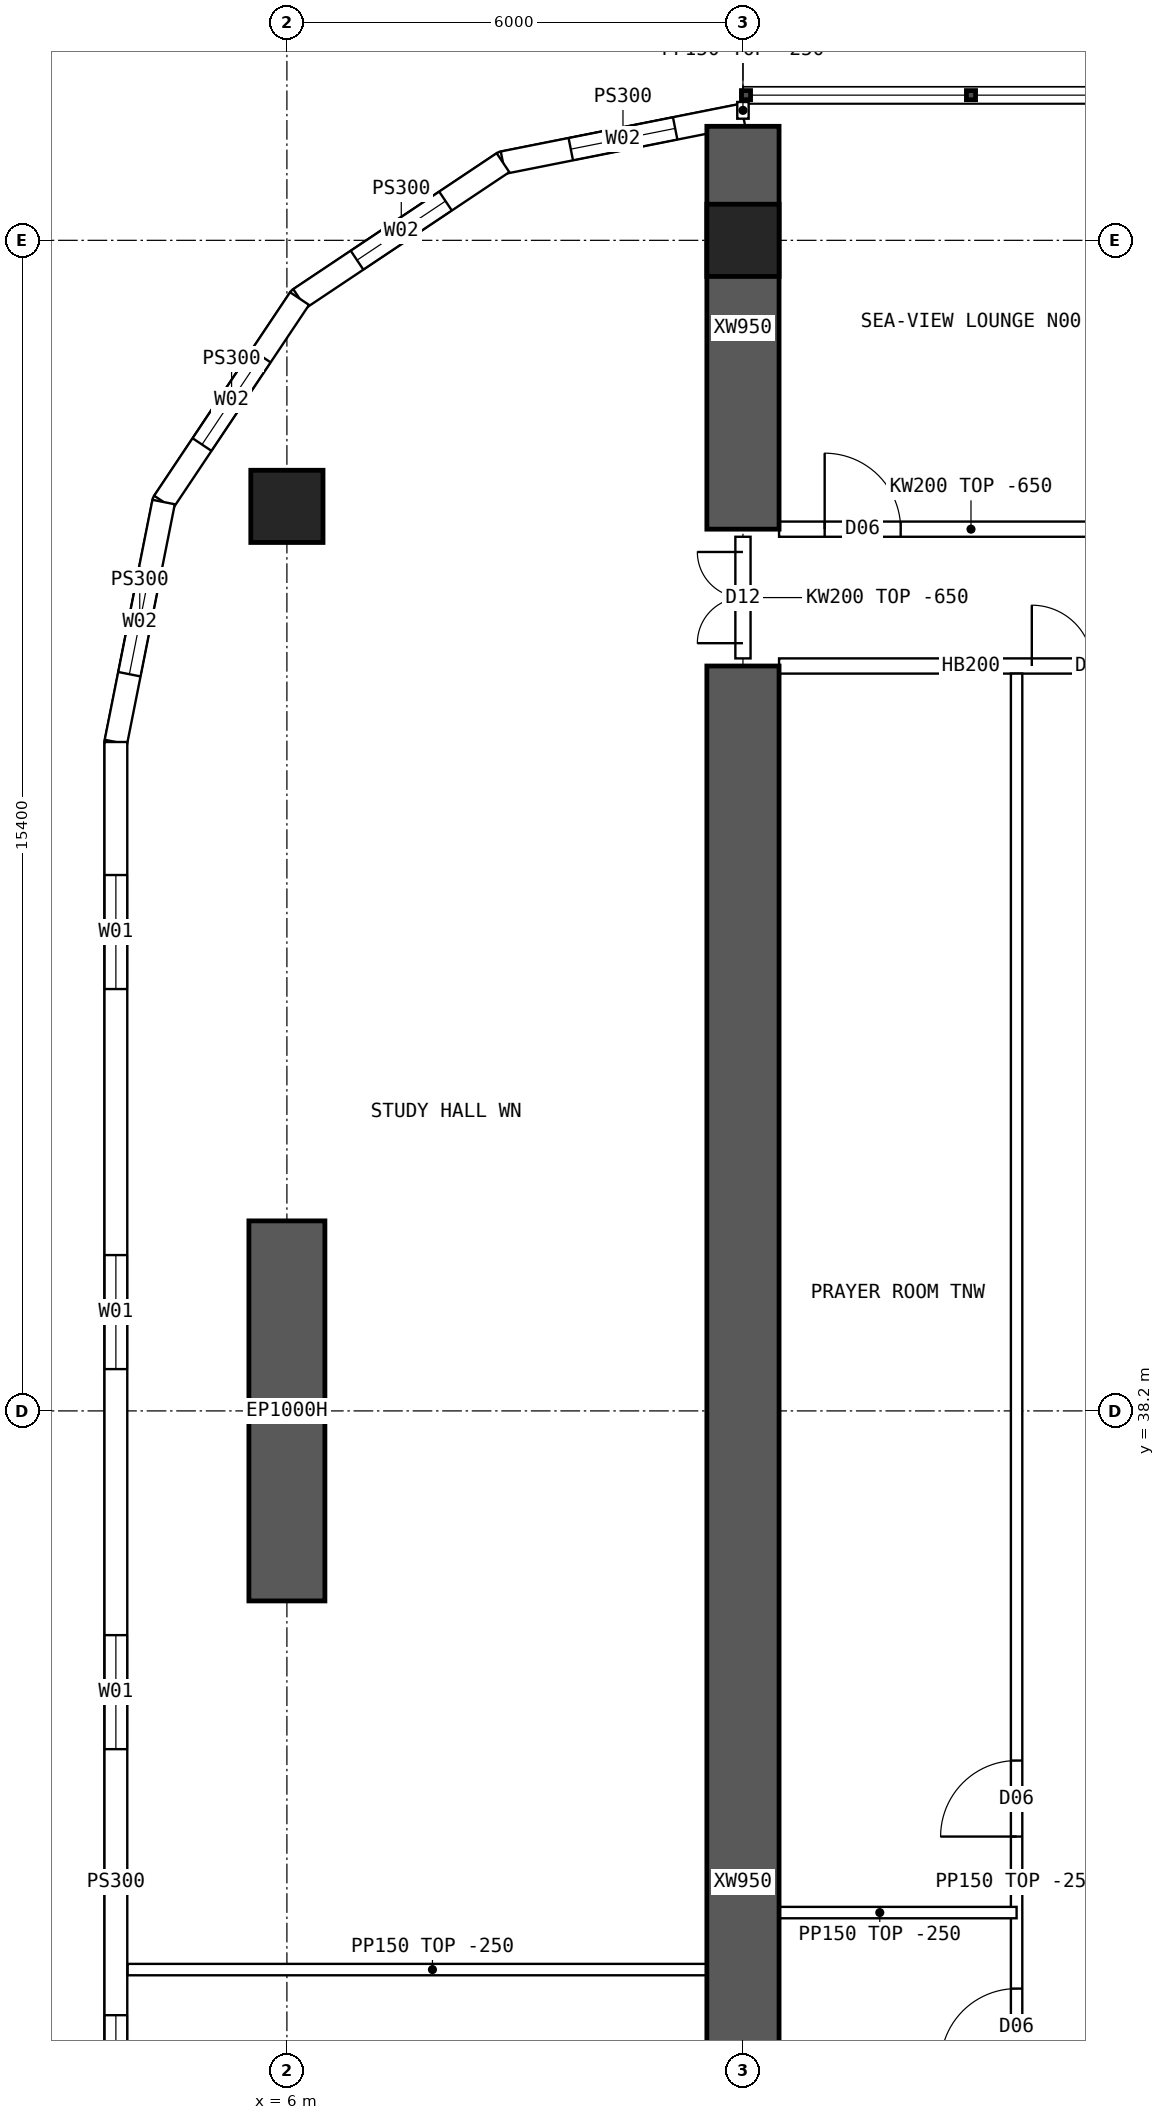
"""IFC4 building model, lengths in metres.
Left out: names, types, materials, properties, quantities, classifications, styles, units other than length and angle.
Written with IfcOpenShell. Run it as: python <this file> out.ifc"""

import sys

from ifc_helpers import new_model, si_unit, direction, frame, frame_2d, origin, origin_2d, place, context, subcontext, project, spatial, polyline, rectangle, hollow_rectangle, outline, extrude, element, fill, save


model = new_model("IFC4")
c1 = context("Model", 3, precision=1e-05, world=origin(), true_north=direction((0.0, 1.0)))
c2 = subcontext(c1, "Body", "Model", "MODEL_VIEW")
j1 = project(units=[si_unit("LENGTHUNIT", "METRE"), si_unit("PLANEANGLEUNIT", "RADIAN")], contexts=[c1])
p1 = place(None, origin())
s1 = spatial("IfcSite", under=j1, at=p1, CompositionType="ELEMENT")
p2 = place(p1, origin())
s2 = spatial("IfcBuilding", under=s1, at=p2, CompositionType="ELEMENT")
p3 = place(p2, frame((0.0, 0.0, 125.65)))
s3 = spatial("IfcBuildingStorey", under=s2, at=p3, CompositionType="ELEMENT", Elevation=125.65)
for number, where, z_axis, x_axis in (
    (1, (12.0, 53.6, 0.0), (0.0, 0.0, 1.0), (1.0, 0.0, 0.0)),
    (2, (6.0, 50.1, 0.0), (0.0, 0.0, 1.0), (1.0, 0.0, 0.0)),
):
    element("IfcColumn", number, at=place(p3, frame(where, z_axis=z_axis, x_axis=x_axis)), inside=s3, PredefinedType="COLUMN", context=c2, shape_type="SweptSolid", body=[
        extrude(hollow_rectangle(XDim=0.95, YDim=0.95, WallThickness=0.095, at=origin_2d()), origin(), (0.0, 0.0, 1.0), 3.75),
    ])
p4 = place(p3, frame((6.0, 35.7, 0.0), z_axis=(0.0, 0.0, 1.0), x_axis=(0.0, 1.0, 0.0)))
e3 = element("IfcWall", 3, at=p4, inside=s3, PredefinedType="SHEAR", context=c2, shape_type="SweptSolid", body=[
    extrude(rectangle(XDim=5.0, YDim=1.0, at=frame_2d((2.5, 0.0))), origin(), (0.0, 0.0, 1.0), 3.75),
])
p5 = place(p3, frame((12.0, 49.8, 0.0), z_axis=(0.0, 0.0, 1.0), x_axis=(0.0, 1.0, 0.0)))
e4 = element("IfcWall", 4, at=p5, inside=s3, PredefinedType="SHEAR", context=c2, shape_type="SweptSolid", body=[
    extrude(rectangle(XDim=5.3, YDim=0.95, at=frame_2d((2.65, 0.0))), origin(), (0.0, 0.0, 1.0), 3.75),
])
p6 = place(p3, frame((12.0, 16.0, 0.0), z_axis=(0.0, 0.0, 1.0), x_axis=(0.0, 1.0, 0.0)))
e5 = element("IfcWall", 5, at=p6, inside=s3, PredefinedType="SHEAR", context=c2, shape_type="SweptSolid", body=[
    extrude(rectangle(XDim=32.0, YDim=0.95, at=frame_2d((16.0, 0.0))), origin(), (0.0, 0.0, 1.0), 3.75),
])
p7 = place(p3, frame((3.75, 47.0, 0.0), z_axis=(0.0, 0.0, 1.0), x_axis=(0.0, -1.0, 0.0)))
e6 = element("IfcWall", 6, at=p7, inside=s3, PredefinedType="SOLIDWALL", context=c2, shape_type="SweptSolid", body=[
    extrude(outline(polyline([(-0.015, -0.15), (30.015, -0.15), (29.985, 0.15), (0.015, 0.15), (-0.015, -0.15)])), origin(), (0.0, 0.0, 1.0), 3.5),
])
p8 = place(p7, frame((1.75, 0.0, 0.9)))
e7 = element("IfcOpeningElement", 7, at=p8, cuts=e6, PredefinedType="OPENING", context=c2, shape_type="SweptSolid", body=[
    extrude(rectangle(XDim=1.5, YDim=2.0, at=frame_2d((0.75, 1.0))), frame((0.0, 0.16, 0.0), z_axis=(0.0, -1.0, 0.0), x_axis=(1.0, 0.0, 0.0)), (0.0, 0.0, 1.0), 0.32),
])
p9 = place(p7, frame((6.75, 0.0, 0.9)))
e8 = element("IfcOpeningElement", 8, at=p9, cuts=e6, PredefinedType="OPENING", context=c2, shape_type="SweptSolid", body=[
    extrude(rectangle(XDim=1.5, YDim=2.0, at=frame_2d((0.75, 1.0))), frame((0.0, 0.16, 0.0), z_axis=(0.0, -1.0, 0.0), x_axis=(1.0, 0.0, 0.0)), (0.0, 0.0, 1.0), 0.32),
])
p10 = place(p7, frame((11.75, 0.0, 0.9)))
e9 = element("IfcOpeningElement", 9, at=p10, cuts=e6, PredefinedType="OPENING", context=c2, shape_type="SweptSolid", body=[
    extrude(rectangle(XDim=1.5, YDim=2.0, at=frame_2d((0.75, 1.0))), frame((0.0, 0.16, 0.0), z_axis=(0.0, -1.0, 0.0), x_axis=(1.0, 0.0, 0.0)), (0.0, 0.0, 1.0), 0.32),
])
p11 = place(p7, frame((16.75, 0.0, 0.9)))
e10 = element("IfcOpeningElement", 10, at=p11, cuts=e6, PredefinedType="OPENING", context=c2, shape_type="SweptSolid", body=[
    extrude(rectangle(XDim=1.5, YDim=2.0, at=frame_2d((0.75, 1.0))), frame((0.0, 0.16, 0.0), z_axis=(0.0, -1.0, 0.0), x_axis=(1.0, 0.0, 0.0)), (0.0, 0.0, 1.0), 0.32),
])
p12 = place(p7, frame((21.75, 0.0, 0.9)))
e11 = element("IfcOpeningElement", 11, at=p12, cuts=e6, PredefinedType="OPENING", context=c2, shape_type="SweptSolid", body=[
    extrude(rectangle(XDim=1.5, YDim=2.0, at=frame_2d((0.75, 1.0))), frame((0.0, 0.16, 0.0), z_axis=(0.0, -1.0, 0.0), x_axis=(1.0, 0.0, 0.0)), (0.0, 0.0, 1.0), 0.32),
])
p13 = place(p7, frame((26.75, 0.0, 0.9)))
e12 = element("IfcOpeningElement", 12, at=p13, cuts=e6, PredefinedType="OPENING", context=c2, shape_type="SweptSolid", body=[
    extrude(rectangle(XDim=1.5, YDim=2.0, at=frame_2d((0.75, 1.0))), frame((0.0, 0.16, 0.0), z_axis=(0.0, -1.0, 0.0), x_axis=(1.0, 0.0, 0.0)), (0.0, 0.0, 1.0), 0.32),
])
p14 = place(p3, frame((12.0, 55.25, 0.0), z_axis=(0.0, 0.0, 1.0), x_axis=(-0.980787251524, -0.195080412259, 0.0)))
e13 = element("IfcWall", 13, at=p14, inside=s3, PredefinedType="SOLIDWALL", context=c2, shape_type="SweptSolid", body=[
    extrude(outline(polyline([(-0.03, -0.15), (3.249, -0.15), (3.189, 0.15), (0.03, 0.15), (-0.03, -0.15)])), origin(), (0.0, 0.0, 1.0), 3.5),
])
p15 = place(p14, frame((0.909, 0.0, 0.9)))
e14 = element("IfcOpeningElement", 14, at=p15, cuts=e13, PredefinedType="OPENING", context=c2, shape_type="SweptSolid", body=[
    extrude(rectangle(XDim=1.4, YDim=1.8, at=frame_2d((0.7, 0.9))), frame((0.0, 0.16, 0.0), z_axis=(0.0, -1.0, 0.0), x_axis=(1.0, 0.0, 0.0)), (0.0, 0.0, 1.0), 0.32),
])
p16 = place(p3, frame((8.843, 54.622, 0.0), z_axis=(0.0, 0.0, 1.0), x_axis=(-0.831443069936, -0.555609954424, 0.0)))
e15 = element("IfcWall", 15, at=p16, inside=s3, PredefinedType="SOLIDWALL", context=c2, shape_type="SweptSolid", body=[
    extrude(outline(polyline([(-0.03, -0.15), (3.249, -0.15), (3.189, 0.15), (0.03, 0.15), (-0.03, -0.15)])), origin(), (0.0, 0.0, 1.0), 3.5),
])
p17 = place(p16, frame((0.909, 0.0, 0.9)))
e16 = element("IfcOpeningElement", 16, at=p17, cuts=e15, PredefinedType="OPENING", context=c2, shape_type="SweptSolid", body=[
    extrude(rectangle(XDim=1.4, YDim=1.8, at=frame_2d((0.7, 0.9))), frame((0.0, 0.16, 0.0), z_axis=(0.0, -1.0, 0.0), x_axis=(1.0, 0.0, 0.0)), (0.0, 0.0, 1.0), 0.32),
])
p18 = place(p3, frame((6.167, 52.833, 0.0), z_axis=(0.0, 0.0, 1.0), x_axis=(-0.555609954424, -0.831443069936, 0.0)))
e17 = element("IfcWall", 17, at=p18, inside=s3, PredefinedType="SOLIDWALL", context=c2, shape_type="SweptSolid", body=[
    extrude(outline(polyline([(-0.03, -0.15), (3.249, -0.15), (3.189, 0.15), (0.03, 0.15), (-0.03, -0.15)])), origin(), (0.0, 0.0, 1.0), 3.5),
])
p19 = place(p18, frame((0.909, 0.0, 0.9)))
e18 = element("IfcOpeningElement", 18, at=p19, cuts=e17, PredefinedType="OPENING", context=c2, shape_type="SweptSolid", body=[
    extrude(rectangle(XDim=1.4, YDim=1.8, at=frame_2d((0.7, 0.9))), frame((0.0, 0.16, 0.0), z_axis=(0.0, -1.0, 0.0), x_axis=(1.0, 0.0, 0.0)), (0.0, 0.0, 1.0), 0.32),
])
p20 = place(p3, frame((4.378, 50.157, 0.0), z_axis=(0.0, 0.0, 1.0), x_axis=(-0.195080412259, -0.980787251524, 0.0)))
e19 = element("IfcWall", 19, at=p20, inside=s3, PredefinedType="SOLIDWALL", context=c2, shape_type="SweptSolid", body=[
    extrude(outline(polyline([(-0.03, -0.15), (3.234, -0.15), (3.204, 0.15), (0.03, 0.15), (-0.03, -0.15)])), origin(), (0.0, 0.0, 1.0), 3.5),
])
p21 = place(p20, frame((0.909, 0.0, 0.9)))
e20 = element("IfcOpeningElement", 20, at=p21, cuts=e19, PredefinedType="OPENING", context=c2, shape_type="SweptSolid", body=[
    extrude(rectangle(XDim=1.4, YDim=1.8, at=frame_2d((0.7, 0.9))), frame((0.0, 0.16, 0.0), z_axis=(0.0, -1.0, 0.0), x_axis=(1.0, 0.0, 0.0)), (0.0, 0.0, 1.0), 0.32),
])
p22 = place(p3, frame((12.475, 49.8, 0.0), z_axis=(0.0, 0.0, 1.0), x_axis=(1.0, 0.0, 0.0)))
e21 = element("IfcWall", 21, at=p22, inside=s3, PredefinedType="SOLIDWALL", context=c2, shape_type="SweptSolid", body=[
    extrude(outline(polyline([(0.0, 0.0), (5.05, 0.0), (5.05, 3.1), (0.0, 3.1), (0.0, 0.0)])), frame((0.0, 0.1, 0.0), z_axis=(0.0, -1.0, 0.0), x_axis=(1.0, 0.0, 0.0)), (0.0, 0.0, 1.0), 0.2),
])
p23 = place(p22, frame((0.6, 0.0, 0.0)))
e22 = element("IfcOpeningElement", 22, at=p23, cuts=e21, PredefinedType="OPENING", context=c2, shape_type="SweptSolid", body=[
    extrude(rectangle(XDim=1.0, YDim=2.1, at=frame_2d((0.5, 1.05))), frame((0.0, 0.11, 0.0), z_axis=(0.0, -1.0, 0.0), x_axis=(1.0, 0.0, 0.0)), (0.0, 0.0, 1.0), 0.22),
])
p24 = place(p3, frame((12.475, 48.0, 0.0), z_axis=(0.0, 0.0, 1.0), x_axis=(1.0, 0.0, 0.0)))
e23 = element("IfcWall", 23, at=p24, inside=s3, PredefinedType="SOLIDWALL", context=c2, shape_type="SweptSolid", body=[
    extrude(rectangle(XDim=5.05, YDim=0.2, at=frame_2d((2.525, 0.0))), origin(), (0.0, 0.0, 1.0), 3.5),
])
p25 = place(p24, frame((3.325, 0.0, 0.0)))
e24 = element("IfcOpeningElement", 24, at=p25, cuts=e23, PredefinedType="OPENING", context=c2, shape_type="SweptSolid", body=[
    extrude(rectangle(XDim=1.6, YDim=2.1, at=frame_2d((0.8, 1.05))), frame((0.0, 0.11, 0.0), z_axis=(0.0, -1.0, 0.0), x_axis=(1.0, 0.0, 0.0)), (0.0, 0.0, 1.0), 0.22),
])
p26 = place(p3, frame((15.6, 16.1, 0.0), z_axis=(0.0, 0.0, 1.0), x_axis=(0.0, 1.0, 0.0)))
e25 = element("IfcWall", 25, at=p26, inside=s3, PredefinedType="PARTITIONING", context=c2, shape_type="SweptSolid", body=[
    extrude(rectangle(XDim=31.8, YDim=0.15, at=frame_2d((15.9, 0.0))), origin(), (0.0, 0.0, 1.0), 3.5),
])
p27 = place(p26, frame((13.5, 0.0, 0.0)))
e26 = element("IfcOpeningElement", 26, at=p27, cuts=e25, PredefinedType="OPENING", context=c2, shape_type="SweptSolid", body=[
    extrude(rectangle(XDim=1.0, YDim=2.1, at=frame_2d((0.5, 1.05))), frame((0.0, 0.085, 0.0), z_axis=(0.0, -1.0, 0.0), x_axis=(1.0, 0.0, 0.0)), (0.0, 0.0, 1.0), 0.17),
])
p28 = place(p26, frame((16.5, 0.0, 0.0)))
e27 = element("IfcOpeningElement", 27, at=p28, cuts=e25, PredefinedType="OPENING", context=c2, shape_type="SweptSolid", body=[
    extrude(rectangle(XDim=1.0, YDim=2.1, at=frame_2d((0.5, 1.05))), frame((0.0, 0.085, 0.0), z_axis=(0.0, -1.0, 0.0), x_axis=(1.0, 0.0, 0.0)), (0.0, 0.0, 1.0), 0.17),
])
p29 = place(p3, frame((12.0, 31.6, 0.0), z_axis=(0.0, 0.0, 1.0), x_axis=(1.0, 0.0, 0.0)))
e28 = element("IfcWall", 28, at=p29, inside=s3, PredefinedType="PARTITIONING", context=c2, shape_type="SweptSolid", body=[
    extrude(rectangle(XDim=3.6, YDim=0.15, at=frame_2d((1.8, 0.0))), origin(), (0.0, 0.0, 1.0), 3.5),
])
p30 = place(p3, frame((3.905, 30.85, 0.0), z_axis=(0.0, 0.0, 1.0), x_axis=(1.0, 0.0, 0.0)))
e29 = element("IfcWall", 29, at=p30, inside=s3, PredefinedType="PARTITIONING", context=c2, shape_type="SweptSolid", body=[
    extrude(outline(polyline([(0.0, 0.0), (8.02, 0.0), (8.02, 3.5), (2.397, 3.5), (2.395, 3.05), (1.797, 3.05), (1.795, 3.5), (0.0, 3.5), (0.0, 0.0)])), frame((0.0, 0.075, 0.0), z_axis=(0.0, -1.0, 0.0), x_axis=(1.0, 0.0, 0.0)), (0.0, 0.0, 1.0), 0.15),
])
p31 = place(p3, frame((12.0, 48.1, 0.0), z_axis=(0.0, 0.0, 1.0), x_axis=(0.0, 1.0, 0.0)))
e30 = element("IfcWall", 30, at=p31, inside=s3, PredefinedType="SOLIDWALL", context=c2, shape_type="SweptSolid", body=[
    extrude(outline(polyline([(0.0, 0.0), (1.6, 0.0), (1.6, 3.1), (0.0, 3.1), (0.0, 0.0)])), frame((0.0, 0.1, 0.0), z_axis=(0.0, -1.0, 0.0), x_axis=(1.0, 0.0, 0.0)), (0.0, 0.0, 1.0), 0.2),
])
p32 = place(p31, frame((0.2, 0.0, 0.0)))
e31 = element("IfcOpeningElement", 31, at=p32, cuts=e30, PredefinedType="OPENING", context=c2, shape_type="SweptSolid", body=[
    extrude(rectangle(XDim=1.2, YDim=2.1, at=frame_2d((0.6, 1.05))), frame((0.0, 0.11, 0.0), z_axis=(0.0, -1.0, 0.0), x_axis=(1.0, 0.0, 0.0)), (0.0, 0.0, 1.0), 0.22),
])
p33 = place(p3, frame((12.0, 55.2, 0.0), z_axis=(0.0, 0.0, 1.0), x_axis=(0.0, 1.0, 0.0)))
e32 = element("IfcWall", 32, at=p33, inside=s3, PredefinedType="PARTITIONING", context=c2, shape_type="SweptSolid", body=[
    extrude(rectangle(XDim=0.22, YDim=0.15, at=frame_2d((0.11, 0.0))), origin(), (0.0, 0.0, 1.0), 3.5),
])
p34 = place(p8, origin())
e33 = element("IfcWindow", 33, at=p34, inside=s3, PartitioningType="SINGLE_PANEL", PredefinedType="WINDOW", context=c2, shape_type="SweptSolid", body=[
    extrude(rectangle(XDim=1.5, YDim=2.0, at=frame_2d((0.75, 1.0))), frame((0.0, 0.03, 0.0), z_axis=(0.0, -1.0, 0.0), x_axis=(1.0, 0.0, 0.0)), (0.0, 0.0, 1.0), 0.06),
])
fill(e7, e33)
p35 = place(p9, origin())
e34 = element("IfcWindow", 34, at=p35, inside=s3, PartitioningType="SINGLE_PANEL", PredefinedType="WINDOW", context=c2, shape_type="SweptSolid", body=[
    extrude(rectangle(XDim=1.5, YDim=2.0, at=frame_2d((0.75, 1.0))), frame((0.0, 0.03, 0.0), z_axis=(0.0, -1.0, 0.0), x_axis=(1.0, 0.0, 0.0)), (0.0, 0.0, 1.0), 0.06),
])
fill(e8, e34)
p36 = place(p10, origin())
e35 = element("IfcWindow", 35, at=p36, inside=s3, PartitioningType="SINGLE_PANEL", PredefinedType="WINDOW", context=c2, shape_type="SweptSolid", body=[
    extrude(rectangle(XDim=1.5, YDim=2.0, at=frame_2d((0.75, 1.0))), frame((0.0, 0.03, 0.0), z_axis=(0.0, -1.0, 0.0), x_axis=(1.0, 0.0, 0.0)), (0.0, 0.0, 1.0), 0.06),
])
fill(e9, e35)
p37 = place(p11, origin())
e36 = element("IfcWindow", 36, at=p37, inside=s3, PartitioningType="SINGLE_PANEL", PredefinedType="WINDOW", context=c2, shape_type="SweptSolid", body=[
    extrude(rectangle(XDim=1.5, YDim=2.0, at=frame_2d((0.75, 1.0))), frame((0.0, 0.03, 0.0), z_axis=(0.0, -1.0, 0.0), x_axis=(1.0, 0.0, 0.0)), (0.0, 0.0, 1.0), 0.06),
])
fill(e10, e36)
p38 = place(p15, origin())
e37 = element("IfcWindow", 37, at=p38, inside=s3, PartitioningType="SINGLE_PANEL", PredefinedType="WINDOW", context=c2, shape_type="SweptSolid", body=[
    extrude(rectangle(XDim=1.4, YDim=1.8, at=frame_2d((0.7, 0.9))), frame((0.0, 0.03, 0.0), z_axis=(0.0, -1.0, 0.0), x_axis=(1.0, 0.0, 0.0)), (0.0, 0.0, 1.0), 0.06),
])
fill(e14, e37)
p39 = place(p17, origin())
e38 = element("IfcWindow", 38, at=p39, inside=s3, PartitioningType="SINGLE_PANEL", PredefinedType="WINDOW", context=c2, shape_type="SweptSolid", body=[
    extrude(rectangle(XDim=1.4, YDim=1.8, at=frame_2d((0.7, 0.9))), frame((0.0, 0.03, 0.0), z_axis=(0.0, -1.0, 0.0), x_axis=(1.0, 0.0, 0.0)), (0.0, 0.0, 1.0), 0.06),
])
fill(e16, e38)
p40 = place(p19, origin())
e39 = element("IfcWindow", 39, at=p40, inside=s3, PartitioningType="SINGLE_PANEL", PredefinedType="WINDOW", context=c2, shape_type="SweptSolid", body=[
    extrude(rectangle(XDim=1.4, YDim=1.8, at=frame_2d((0.7, 0.9))), frame((0.0, 0.03, 0.0), z_axis=(0.0, -1.0, 0.0), x_axis=(1.0, 0.0, 0.0)), (0.0, 0.0, 1.0), 0.06),
])
fill(e18, e39)
p41 = place(p21, origin())
e40 = element("IfcWindow", 40, at=p41, inside=s3, PartitioningType="SINGLE_PANEL", PredefinedType="WINDOW", context=c2, shape_type="SweptSolid", body=[
    extrude(rectangle(XDim=1.4, YDim=1.8, at=frame_2d((0.7, 0.9))), frame((0.0, 0.03, 0.0), z_axis=(0.0, -1.0, 0.0), x_axis=(1.0, 0.0, 0.0)), (0.0, 0.0, 1.0), 0.06),
])
fill(e20, e40)
p42 = place(p25, origin())
e41 = element("IfcDoor", 41, at=p42, inside=s3, OperationType="DOUBLE_DOOR_SINGLE_SWING", PredefinedType="DOOR", context=c2, shape_type="SweptSolid", body=[
    extrude(rectangle(XDim=1.6, YDim=2.1, at=frame_2d((0.8, 1.05))), frame((0.0, 0.025, 0.0), z_axis=(0.0, -1.0, 0.0), x_axis=(1.0, 0.0, 0.0)), (0.0, 0.0, 1.0), 0.05),
])
fill(e24, e41)
p43 = place(p23, origin())
e42 = element("IfcDoor", 42, at=p43, inside=s3, OperationType="SINGLE_SWING_LEFT", PredefinedType="DOOR", context=c2, shape_type="SweptSolid", body=[
    extrude(rectangle(XDim=1.0, YDim=2.1, at=frame_2d((0.5, 1.05))), frame((0.0, 0.025, 0.0), z_axis=(0.0, -1.0, 0.0), x_axis=(1.0, 0.0, 0.0)), (0.0, 0.0, 1.0), 0.05),
])
fill(e22, e42)
p44 = place(p27, origin())
e43 = element("IfcDoor", 43, at=p44, inside=s3, OperationType="SINGLE_SWING_LEFT", PredefinedType="DOOR", context=c2, shape_type="SweptSolid", body=[
    extrude(rectangle(XDim=1.0, YDim=2.1, at=frame_2d((0.5, 1.05))), frame((0.0, 0.025, 0.0), z_axis=(0.0, -1.0, 0.0), x_axis=(1.0, 0.0, 0.0)), (0.0, 0.0, 1.0), 0.05),
])
fill(e26, e43)
p45 = place(p28, origin())
e44 = element("IfcDoor", 44, at=p45, inside=s3, OperationType="SINGLE_SWING_LEFT", PredefinedType="DOOR", context=c2, shape_type="SweptSolid", body=[
    extrude(rectangle(XDim=1.0, YDim=2.1, at=frame_2d((0.5, 1.05))), frame((0.0, 0.025, 0.0), z_axis=(0.0, -1.0, 0.0), x_axis=(1.0, 0.0, 0.0)), (0.0, 0.0, 1.0), 0.05),
])
fill(e27, e44)
p46 = place(p32, origin())
e45 = element("IfcDoor", 45, at=p46, inside=s3, OperationType="DOUBLE_DOOR_SINGLE_SWING", PredefinedType="DOOR", context=c2, shape_type="SweptSolid", body=[
    extrude(rectangle(XDim=1.2, YDim=2.1, at=frame_2d((0.6, 1.05))), frame((0.0, 0.025, 0.0), z_axis=(0.0, -1.0, 0.0), x_axis=(1.0, 0.0, 0.0)), (0.0, 0.0, 1.0), 0.05),
])
fill(e31, e45)
save(model, sys.argv[1])
